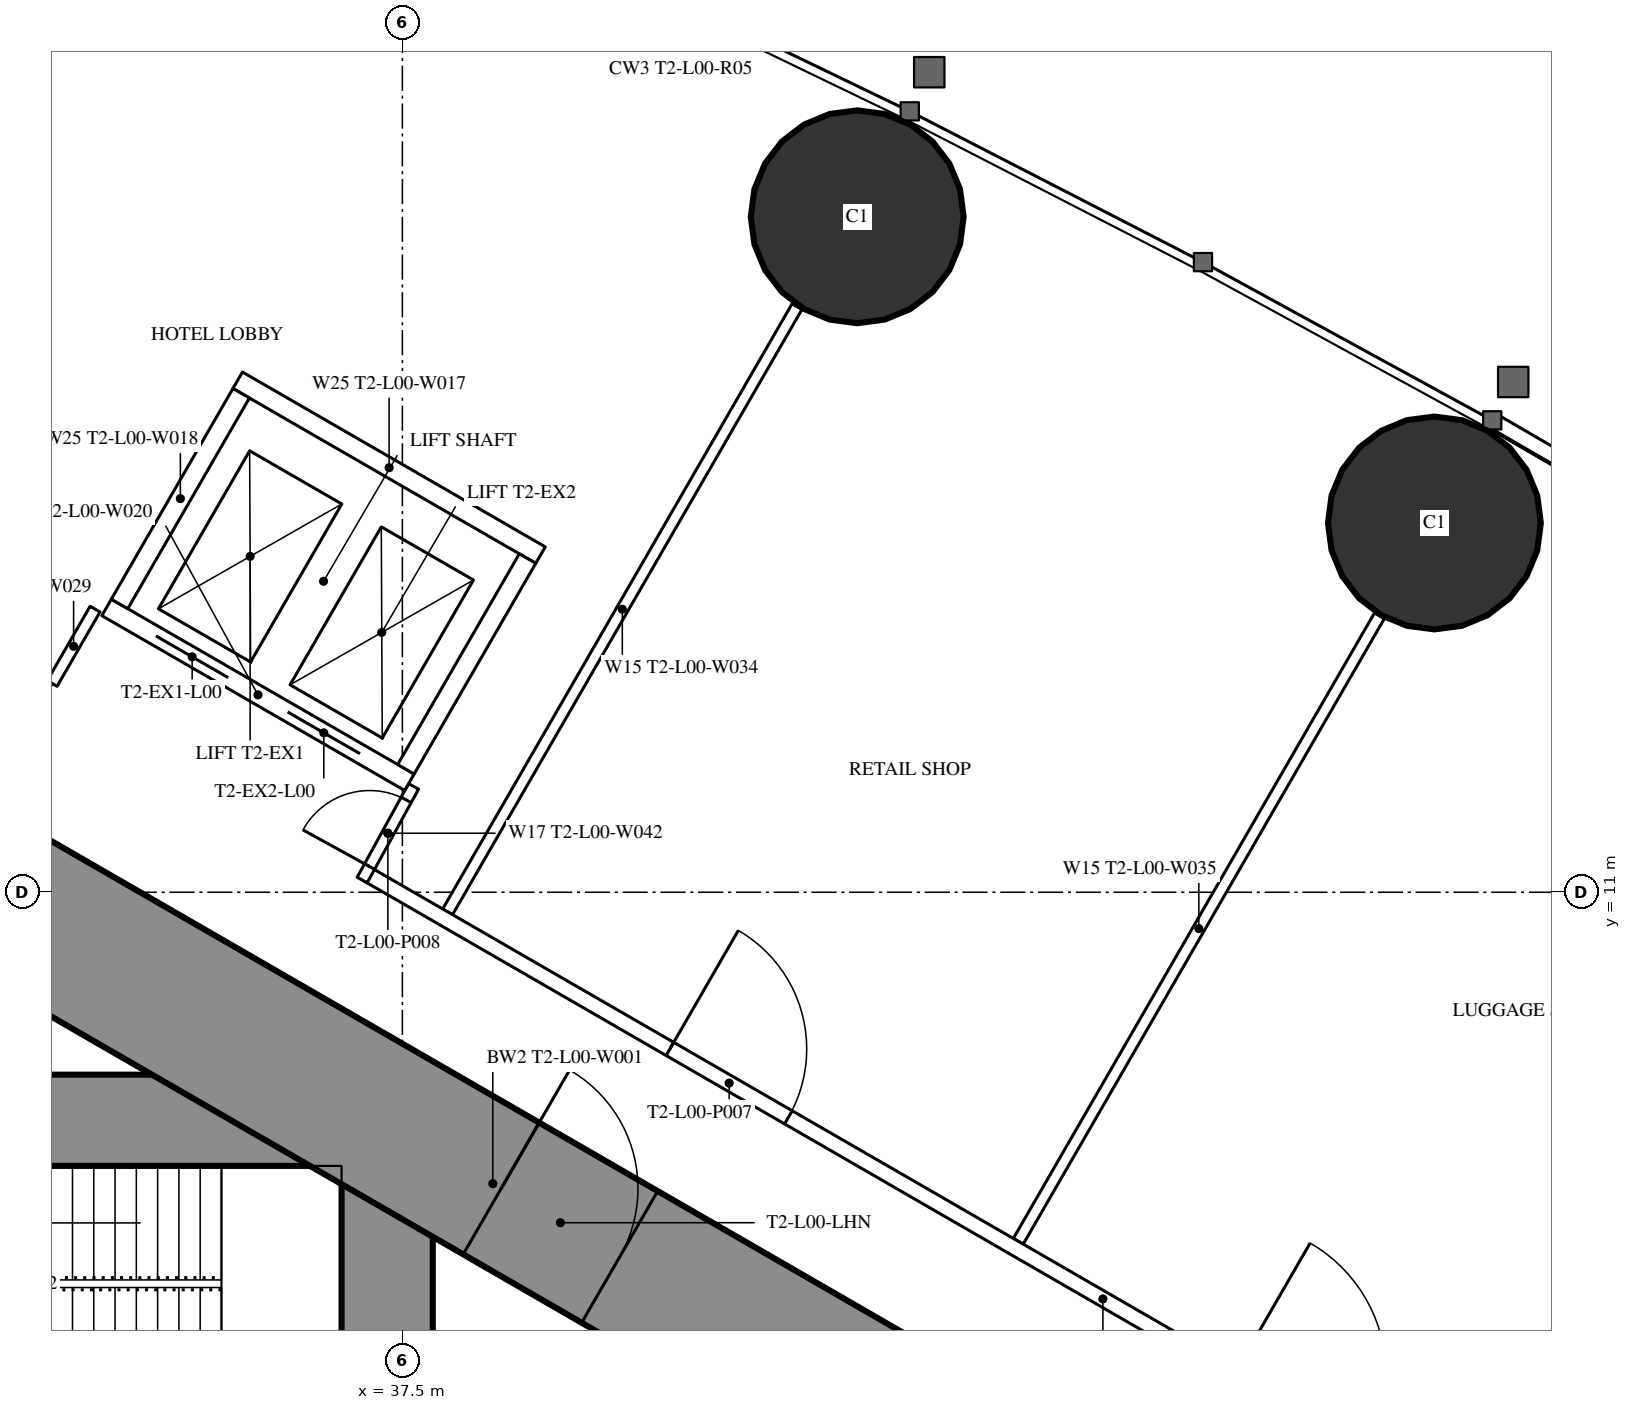
"""IFC4 building model, lengths in metres.
Left out: names, types, materials, properties, quantities, classifications, styles, units other than length and angle.
Written with IfcOpenShell. Run it as: python <this file> out.ifc"""

import sys

from ifc_helpers import new_model, si_unit, direction, frame, frame_2d, origin, origin_2d, place, context, subcontext, project, spatial, rectangle, hollow_circle, extrude, element, fill, save


model = new_model("IFC4")
c1 = context("Model", 3, precision=1e-05, world=origin(), true_north=direction((0.0, 1.0)))
c2 = subcontext(c1, "Body", "Model", "MODEL_VIEW")
j1 = project(units=[si_unit("LENGTHUNIT", "METRE"), si_unit("PLANEANGLEUNIT", "RADIAN")], contexts=[c1])
p1 = place(None, origin())
s1 = spatial("IfcSite", under=j1, at=p1, CompositionType="ELEMENT")
p2 = place(p1, origin())
s2 = spatial("IfcBuilding", under=s1, at=p2, CompositionType="ELEMENT")
p3 = place(p2, origin())
s3 = spatial("IfcBuildingStorey", under=s2, at=p3, CompositionType="ELEMENT", Elevation=0.0)
for number, where, z_axis, x_axis in (
    (1, (51.078, 15.858, 0.0), (0.0, 0.0, 1.0), (1.0, 0.0, 0.0)),
    (2, (43.484, 19.886, 0.0), (0.0, 0.0, 1.0), (1.0, 0.0, 0.0)),
):
    element("IfcColumn", number, at=place(p3, frame(where, z_axis=z_axis, x_axis=x_axis)), inside=s3, PredefinedType="COLUMN", context=c2, shape_type="SweptSolid", body=[
        extrude(hollow_circle(Radius=1.4, WallThickness=0.12, at=origin_2d()), origin(), (0.0, 0.0, 1.0), 7.2),
    ])
p4 = place(p3, frame((37.3, -8.6, 0.0), z_axis=(0.0, 0.0, 1.0), x_axis=(0.0, 1.0, 0.0)))
e3 = element("IfcWall", 3, at=p4, inside=s3, PredefinedType="SHEAR", context=c2, shape_type="SweptSolid", body=[
    extrude(rectangle(XDim=17.2, YDim=1.2, at=frame_2d((8.6, 0.0))), origin(), (0.0, 0.0, 1.0), 7.2),
])
p5 = place(p4, frame((7.7, 0.0, 0.0)))
e4 = element("IfcOpeningElement", 4, at=p5, cuts=e3, PredefinedType="OPENING", context=c2, shape_type="SweptSolid", body=[
    extrude(rectangle(XDim=1.8, YDim=2.2, at=frame_2d((0.9, 1.1))), frame((0.0, 0.61, 0.0), z_axis=(0.0, -1.0, 0.0), x_axis=(1.0, 0.0, 0.0)), (0.0, 0.0, 1.0), 1.22),
])
p6 = place(p3, frame((28.3, 8.0, 0.0), z_axis=(0.0, 0.0, 1.0), x_axis=(1.0, 0.0, 0.0)))
e5 = element("IfcWall", 5, at=p6, inside=s3, PredefinedType="SHEAR", context=c2, shape_type="SweptSolid", body=[
    extrude(rectangle(XDim=8.4, YDim=1.2, at=frame_2d((4.2, 0.0))), origin(), (0.0, 0.0, 1.0), 7.2),
])
p7 = place(p6, frame((0.25, 0.0, 0.0)))
e6 = element("IfcOpeningElement", 6, at=p7, cuts=e5, PredefinedType="OPENING", context=c2, shape_type="SweptSolid", body=[
    extrude(rectangle(XDim=1.0, YDim=2.2, at=frame_2d((0.5, 1.1))), frame((0.0, 0.61, 0.0), z_axis=(0.0, -1.0, 0.0), x_axis=(1.0, 0.0, 0.0)), (0.0, 0.0, 1.0), 1.22),
])
p8 = place(p3, frame((27.2, 13.8, 0.0), z_axis=(0.0, 0.0, 1.0), x_axis=(0.866024545924, -0.500001485854, 0.0)))
e7 = element("IfcWall", 7, at=p8, inside=s3, PredefinedType="SHEAR", context=c2, shape_type="SweptSolid", body=[
    extrude(rectangle(XDim=26.534, YDim=2.0, at=frame_2d((13.267, 0.0))), origin(), (0.0, 0.0, 1.0), 7.2),
])
p9 = place(p8, frame((4.6, 0.0, 0.0)))
e8 = element("IfcOpeningElement", 8, at=p9, cuts=e7, PredefinedType="OPENING", context=c2, shape_type="SweptSolid", body=[
    extrude(rectangle(XDim=1.0, YDim=2.2, at=frame_2d((0.5, 1.1))), frame((0.0, 1.01, 0.0), z_axis=(0.0, -1.0, 0.0), x_axis=(1.0, 0.0, 0.0)), (0.0, 0.0, 1.0), 2.02),
])
p10 = place(p8, frame((13.395, 0.0, 0.0)))
e9 = element("IfcOpeningElement", 9, at=p10, cuts=e7, PredefinedType="OPENING", context=c2, shape_type="SweptSolid", body=[
    extrude(rectangle(XDim=1.8, YDim=2.2, at=frame_2d((0.9, 1.1))), frame((0.0, 1.01, 0.0), z_axis=(0.0, -1.0, 0.0), x_axis=(1.0, 0.0, 0.0)), (0.0, 0.0, 1.0), 2.02),
])
p11 = place(p3, frame((51.839, 17.209, 0.0), z_axis=(0.0, 0.0, 1.0), x_axis=(0.864866989785, -0.502001085637, 0.0)))
e10 = element("IfcWall", 10, at=p11, inside=s3, PredefinedType="STANDARD", context=c2, shape_type="SweptSolid", body=[
    extrude(rectangle(XDim=4.338, YDim=0.2, at=frame_2d((2.169, 0.0))), origin(), (0.0, 0.0, 1.0), 6.85),
])
p12 = place(p11, frame((1.319, 0.0, 0.0)))
e11 = element("IfcOpeningElement", 11, at=p12, cuts=e10, PredefinedType="OPENING", context=c2, shape_type="SweptSolid", body=[
    extrude(rectangle(XDim=1.8, YDim=2.4, at=frame_2d((0.9, 1.2))), frame((0.0, 0.11, 0.0), z_axis=(0.0, -1.0, 0.0), x_axis=(1.0, 0.0, 0.0)), (0.0, 0.0, 1.0), 0.22),
])
p13 = place(p3, frame((38.095, 10.743, 0.0), z_axis=(0.0, 0.0, 1.0), x_axis=(0.499989105942, 0.866031693381, 0.0)))
e12 = element("IfcWall", 12, at=p13, inside=s3, PredefinedType="PARTITIONING", context=c2, shape_type="SweptSolid", body=[
    extrude(rectangle(XDim=9.194, YDim=0.15, at=frame_2d((4.597, 0.0))), origin(), (0.0, 0.0, 1.0), 5.85),
])
p14 = place(p3, frame((45.603, 6.408, 0.0), z_axis=(0.0, 0.0, 1.0), x_axis=(0.499999740363, 0.866025553686, 0.0)))
e13 = element("IfcWall", 13, at=p14, inside=s3, PredefinedType="PARTITIONING", context=c2, shape_type="SweptSolid", body=[
    extrude(rectangle(XDim=9.501, YDim=0.15, at=frame_2d((4.751, 0.0))), origin(), (0.0, 0.0, 1.0), 5.85),
])
p15 = place(p3, frame((27.5, 16.744, 0.0), z_axis=(0.0, 0.0, 1.0), x_axis=(0.866035319247, -0.499982825521, 0.0)))
e14 = element("IfcWall", 14, at=p15, inside=s3, PredefinedType="PARTITIONING", context=c2, shape_type="SweptSolid", body=[
    extrude(rectangle(XDim=6.169, YDim=0.2, at=frame_2d((3.084, 0.0))), origin(), (0.0, 0.0, 1.0), 6.85),
])
p16 = place(p3, frame((37.034, 11.24, 0.0), z_axis=(0.0, 0.0, 1.0), x_axis=(0.866025942536, -0.499999066854, 0.0)))
e15 = element("IfcWall", 15, at=p16, inside=s3, PredefinedType="PARTITIONING", context=c2, shape_type="SweptSolid", body=[
    extrude(rectangle(XDim=22.36, YDim=0.2, at=frame_2d((11.18, 0.0))), origin(), (0.0, 0.0, 1.0), 6.85),
])
p17 = place(p16, frame((19.423, 0.0, 0.0)))
e16 = element("IfcOpeningElement", 16, at=p17, cuts=e15, PredefinedType="OPENING", context=c2, shape_type="SweptSolid", body=[
    extrude(rectangle(XDim=1.8, YDim=2.2, at=frame_2d((0.9, 1.1))), frame((0.0, 0.11, 0.0), z_axis=(0.0, -1.0, 0.0), x_axis=(1.0, 0.0, 0.0)), (0.0, 0.0, 1.0), 0.22),
])
p18 = place(p16, frame((13.174, 0.0, 0.0)))
e17 = element("IfcOpeningElement", 17, at=p18, cuts=e15, PredefinedType="OPENING", context=c2, shape_type="SweptSolid", body=[
    extrude(rectangle(XDim=2.0, YDim=2.4, at=frame_2d((1.0, 1.2))), frame((0.0, 0.11, 0.0), z_axis=(0.0, -1.0, 0.0), x_axis=(1.0, 0.0, 0.0)), (0.0, 0.0, 1.0), 0.22),
])
p19 = place(p16, frame((4.602, 0.0, 0.0)))
e18 = element("IfcOpeningElement", 18, at=p19, cuts=e15, PredefinedType="OPENING", context=c2, shape_type="SweptSolid", body=[
    extrude(rectangle(XDim=1.8, YDim=2.2, at=frame_2d((0.9, 1.1))), frame((0.0, 0.11, 0.0), z_axis=(0.0, -1.0, 0.0), x_axis=(1.0, 0.0, 0.0)), (0.0, 0.0, 1.0), 0.22),
])
p20 = place(p3, frame((36.971, 11.161, 0.0), z_axis=(0.0, 0.0, 1.0), x_axis=(0.481491794093, 0.876450598848, 0.0)))
e19 = element("IfcWall", 19, at=p20, inside=s3, PredefinedType="PARTITIONING", context=c2, shape_type="SweptSolid", body=[
    extrude(rectangle(XDim=1.405, YDim=0.15, at=frame_2d((0.703, 0.0))), origin(), (0.0, 0.0, 1.0), 6.85),
])
p21 = place(p20, frame((0.203, 0.0, 0.0)))
e20 = element("IfcOpeningElement", 20, at=p21, cuts=e19, PredefinedType="OPENING", context=c2, shape_type="SweptSolid", body=[
    extrude(rectangle(XDim=1.0, YDim=2.2, at=frame_2d((0.5, 1.1))), frame((0.0, 0.085, 0.0), z_axis=(0.0, -1.0, 0.0), x_axis=(1.0, 0.0, 0.0)), (0.0, 0.0, 1.0), 0.17),
])
p22 = place(p3, frame((32.892, 13.747, 0.0), z_axis=(0.0, 0.0, 1.0), x_axis=(0.499928262689, 0.866066817379, 0.0)))
e21 = element("IfcWall", 21, at=p22, inside=s3, PredefinedType="PARTITIONING", context=c2, shape_type="SweptSolid", body=[
    extrude(rectangle(XDim=1.13, YDim=0.15, at=frame_2d((0.565, 0.0))), origin(), (0.0, 0.0, 1.0), 6.85),
])
p23 = place(p3, frame((33.608, 14.747, 0.0), z_axis=(0.0, 0.0, 1.0), x_axis=(0.866043305498, -0.49996899204, 0.0)))
e22 = element("IfcWall", 22, at=p23, inside=s3, PredefinedType="PARTITIONING", context=c2, shape_type="SweptSolid", body=[
    extrude(rectangle(XDim=4.6, YDim=0.25, at=frame_2d((2.3, 0.0))), origin(), (0.0, 0.0, 1.0), 6.85),
])
p24 = place(p23, frame((0.75, 0.0, 0.0)))
e23 = element("IfcOpeningElement", 23, at=p24, cuts=e22, PredefinedType="OPENING", context=c2, shape_type="SweptSolid", body=[
    extrude(rectangle(XDim=1.1, YDim=2.2, at=frame_2d((0.55, 1.1))), frame((0.0, 0.135, 0.0), z_axis=(0.0, -1.0, 0.0), x_axis=(1.0, 0.0, 0.0)), (0.0, 0.0, 1.0), 0.27),
])
p25 = place(p23, frame((2.75, 0.0, 0.0)))
e24 = element("IfcOpeningElement", 24, at=p25, cuts=e22, PredefinedType="OPENING", context=c2, shape_type="SweptSolid", body=[
    extrude(rectangle(XDim=1.1, YDim=2.2, at=frame_2d((0.55, 1.1))), frame((0.0, 0.135, 0.0), z_axis=(0.0, -1.0, 0.0), x_axis=(1.0, 0.0, 0.0)), (0.0, 0.0, 1.0), 0.27),
])
p26 = place(p3, frame((35.333, 17.736, 0.0), z_axis=(0.0, 0.0, 1.0), x_axis=(0.866043305498, -0.49996899204, 0.0)))
e25 = element("IfcWall", 25, at=p26, inside=s3, PredefinedType="PARTITIONING", context=c2, shape_type="SweptSolid", body=[
    extrude(rectangle(XDim=4.6, YDim=0.25, at=frame_2d((2.3, 0.0))), origin(), (0.0, 0.0, 1.0), 6.85),
])
for number, where, z_axis, x_axis in (
    (26, (33.779, 14.793, 0.0), (0.0, 0.0, 1.0), (0.5, 0.866, 0.0)),
    (27, (37.547, 12.618, 0.0), (0.0, 0.0, 1.0), (0.5, 0.866, 0.0)),
):
    element("IfcWall", number, at=place(p3, frame(where, z_axis=z_axis, x_axis=x_axis)), inside=s3, PredefinedType="PARTITIONING", context=c2, shape_type="SweptSolid", body=[
        extrude(rectangle(XDim=3.201, YDim=0.25, at=frame_2d((1.6, 0.0))), origin(), (0.0, 0.0, 1.0), 6.85),
    ])
p27 = place(p19, origin())
e28 = element("IfcDoor", 28, at=p27, inside=s3, OperationType="DOUBLE_DOOR_SINGLE_SWING", PredefinedType="DOOR", context=c2, shape_type="SweptSolid", body=[
    extrude(rectangle(XDim=1.8, YDim=2.2, at=frame_2d((0.9, 1.1))), frame((0.0, 0.025, 0.0), z_axis=(0.0, -1.0, 0.0), x_axis=(1.0, 0.0, 0.0)), (0.0, 0.0, 1.0), 0.05),
])
fill(e18, e28)
p28 = place(p21, origin())
e29 = element("IfcDoor", 29, at=p28, inside=s3, OperationType="SINGLE_SWING_LEFT", PredefinedType="DOOR", context=c2, shape_type="SweptSolid", body=[
    extrude(rectangle(XDim=1.0, YDim=2.2, at=frame_2d((0.5, 1.1))), frame((0.0, 0.025, 0.0), z_axis=(0.0, -1.0, 0.0), x_axis=(1.0, 0.0, 0.0)), (0.0, 0.0, 1.0), 0.05),
])
fill(e20, e29)
p29 = place(p10, origin())
e30 = element("IfcDoor", 30, at=p29, inside=s3, OperationType="DOUBLE_DOOR_SINGLE_SWING", PredefinedType="DOOR", context=c2, shape_type="SweptSolid", body=[
    extrude(rectangle(XDim=1.8, YDim=2.2, at=frame_2d((0.9, 1.1))), frame((0.0, 0.025, 0.0), z_axis=(0.0, -1.0, 0.0), x_axis=(1.0, 0.0, 0.0)), (0.0, 0.0, 1.0), 0.05),
])
fill(e9, e30)
p30 = place(p24, origin())
e31 = element("IfcDoor", 31, at=p30, inside=s3, OperationType="DOUBLE_DOOR_SLIDING", PredefinedType="USERDEFINED", context=c2, shape_type="SweptSolid", body=[
    extrude(rectangle(XDim=1.1, YDim=2.2, at=frame_2d((0.55, 1.1))), frame((0.0, 0.025, 0.0), z_axis=(0.0, -1.0, 0.0), x_axis=(1.0, 0.0, 0.0)), (0.0, 0.0, 1.0), 0.05),
])
fill(e23, e31)
p31 = place(p25, origin())
e32 = element("IfcDoor", 32, at=p31, inside=s3, OperationType="DOUBLE_DOOR_SLIDING", PredefinedType="USERDEFINED", context=c2, shape_type="SweptSolid", body=[
    extrude(rectangle(XDim=1.1, YDim=2.2, at=frame_2d((0.55, 1.1))), frame((0.0, 0.025, 0.0), z_axis=(0.0, -1.0, 0.0), x_axis=(1.0, 0.0, 0.0)), (0.0, 0.0, 1.0), 0.05),
])
fill(e24, e32)
save(model, sys.argv[1])
